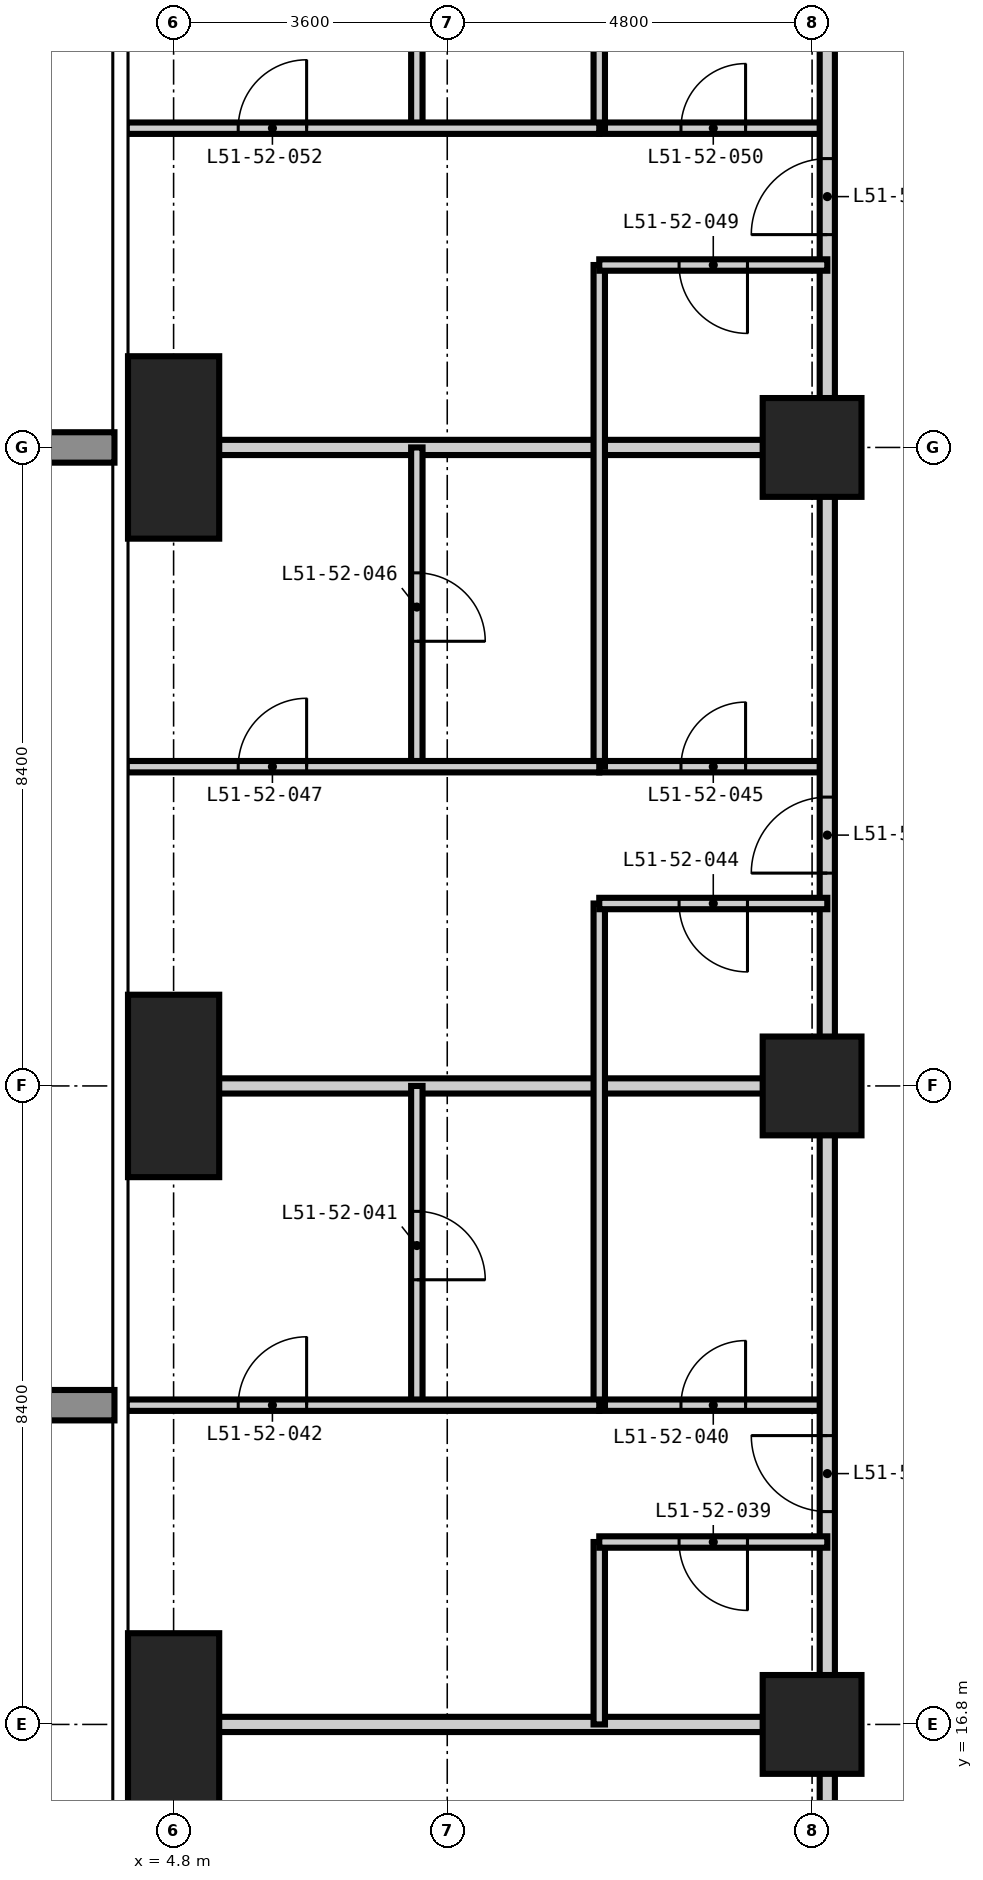
"""IFC4 building model, lengths in metres.
Left out: names, types, materials, properties, quantities, classifications, styles, units other than length and angle.
Written with IfcOpenShell. Run it as: python <this file> out.ifc"""

import sys

from ifc_helpers import new_model, si_unit, direction, frame, frame_2d, origin, origin_2d, place, context, subcontext, project, spatial, rectangle, extrude, element, fill, save


model = new_model("IFC4")
c1 = context("Model", 3, precision=1e-05, world=origin(), true_north=direction((0.0, 1.0)))
c2 = subcontext(c1, "Body", "Model", "MODEL_VIEW")
j1 = project(units=[si_unit("LENGTHUNIT", "METRE"), si_unit("PLANEANGLEUNIT", "RADIAN")], contexts=[c1])
p1 = place(None, origin())
s1 = spatial("IfcSite", under=j1, at=p1, CompositionType="ELEMENT")
p2 = place(p1, origin())
s2 = spatial("IfcBuilding", under=s1, at=p2, CompositionType="ELEMENT")
p3 = place(p2, frame((0.0, 0.0, 198.6)))
s3 = spatial("IfcBuildingStorey", under=s2, at=p3, CompositionType="ELEMENT", Elevation=198.6)
for number, where, z_axis, x_axis in (
    (1, (4.8, 16.8, -0.35), (0.0, 0.0, 1.0), (1.0, 0.0, 0.0)),
    (2, (4.8, 25.2, -0.35), (0.0, 0.0, 1.0), (1.0, 0.0, 0.0)),
    (3, (4.8, 33.6, -0.35), (0.0, 0.0, 1.0), (1.0, 0.0, 0.0)),
):
    element("IfcColumn", number, at=place(p3, frame(where, z_axis=z_axis, x_axis=x_axis)), inside=s3, PredefinedType="COLUMN", context=c2, shape_type="SweptSolid", body=[
        extrude(rectangle(XDim=1.2, YDim=2.4, at=origin_2d()), origin(), (0.0, 0.0, 1.0), 3.6),
    ])
for number, where, z_axis, x_axis in (
    (4, (13.2, 16.8, -0.35), (0.0, 0.0, 1.0), (1.0, 0.0, 0.0)),
    (5, (13.2, 25.2, -0.35), (0.0, 0.0, 1.0), (1.0, 0.0, 0.0)),
    (6, (13.2, 33.6, -0.35), (0.0, 0.0, 1.0), (1.0, 0.0, 0.0)),
):
    element("IfcColumn", number, at=place(p3, frame(where, z_axis=z_axis, x_axis=x_axis)), inside=s3, PredefinedType="COLUMN", context=c2, shape_type="SweptSolid", body=[
        extrude(rectangle(XDim=1.3, YDim=1.3, at=origin_2d()), origin(), (0.0, 0.0, 1.0), 3.6),
    ])
p4 = place(p3, frame((10.4, 21.0, 0.0), z_axis=(0.0, 0.0, 1.0), x_axis=(1.0, 0.0, 0.0)))
e7 = element("IfcWall", 7, at=p4, inside=s3, PredefinedType="PARTITIONING", context=c2, shape_type="SweptSolid", body=[
    extrude(rectangle(XDim=3.0, YDim=0.15, at=frame_2d((1.5, 0.0))), origin(), (0.0, 0.0, 1.0), 3.25),
])
p5 = place(p4, frame((1.075, 0.0, 0.0)))
e8 = element("IfcOpeningElement", 8, at=p5, cuts=e7, PredefinedType="OPENING", context=c2, shape_type="SweptSolid", body=[
    extrude(rectangle(XDim=0.85, YDim=2.1, at=frame_2d((0.425, 1.05))), frame((0.0, 0.085, 0.0), z_axis=(0.0, -1.0, 0.0), x_axis=(1.0, 0.0, 0.0)), (0.0, 0.0, 1.0), 0.17),
])
p6 = place(p3, frame((10.4, 29.4, 0.0), z_axis=(0.0, 0.0, 1.0), x_axis=(1.0, 0.0, 0.0)))
e9 = element("IfcWall", 9, at=p6, inside=s3, PredefinedType="PARTITIONING", context=c2, shape_type="SweptSolid", body=[
    extrude(rectangle(XDim=3.0, YDim=0.15, at=frame_2d((1.5, 0.0))), origin(), (0.0, 0.0, 1.0), 3.25),
])
p7 = place(p6, frame((1.075, 0.0, 0.0)))
e10 = element("IfcOpeningElement", 10, at=p7, cuts=e9, PredefinedType="OPENING", context=c2, shape_type="SweptSolid", body=[
    extrude(rectangle(XDim=0.85, YDim=2.1, at=frame_2d((0.425, 1.05))), frame((0.0, 0.085, 0.0), z_axis=(0.0, -1.0, 0.0), x_axis=(1.0, 0.0, 0.0)), (0.0, 0.0, 1.0), 0.17),
])
p8 = place(p3, frame((10.4, 37.8, 0.0), z_axis=(0.0, 0.0, 1.0), x_axis=(1.0, 0.0, 0.0)))
e11 = element("IfcWall", 11, at=p8, inside=s3, PredefinedType="PARTITIONING", context=c2, shape_type="SweptSolid", body=[
    extrude(rectangle(XDim=3.0, YDim=0.15, at=frame_2d((1.5, 0.0))), origin(), (0.0, 0.0, 1.0), 3.25),
])
p9 = place(p8, frame((1.075, 0.0, 0.0)))
e12 = element("IfcOpeningElement", 12, at=p9, cuts=e11, PredefinedType="OPENING", context=c2, shape_type="SweptSolid", body=[
    extrude(rectangle(XDim=0.85, YDim=2.1, at=frame_2d((0.425, 1.05))), frame((0.0, 0.085, 0.0), z_axis=(0.0, -1.0, 0.0), x_axis=(1.0, 0.0, 0.0)), (0.0, 0.0, 1.0), 0.17),
])
p10 = place(p3, frame((13.4, 13.4, 0.0), z_axis=(0.0, 0.0, 1.0), x_axis=(0.0, 1.0, 0.0)))
e13 = element("IfcWall", 13, at=p10, inside=s3, PredefinedType="PARTITIONING", context=c2, shape_type="SweptSolid", body=[
    extrude(rectangle(XDim=31.4, YDim=0.2, at=frame_2d((15.7, 0.0))), origin(), (0.0, 0.0, 1.0), 3.25),
])
p11 = place(p10, frame((6.2, 0.0, 0.0)))
e14 = element("IfcOpeningElement", 14, at=p11, cuts=e13, PredefinedType="OPENING", context=c2, shape_type="SweptSolid", body=[
    extrude(rectangle(XDim=1.0, YDim=2.2, at=frame_2d((0.5, 1.1))), frame((0.0, 0.11, 0.0), z_axis=(0.0, -1.0, 0.0), x_axis=(1.0, 0.0, 0.0)), (0.0, 0.0, 1.0), 0.22),
])
p12 = place(p10, frame((14.6, 0.0, 0.0)))
e15 = element("IfcOpeningElement", 15, at=p12, cuts=e13, PredefinedType="OPENING", context=c2, shape_type="SweptSolid", body=[
    extrude(rectangle(XDim=1.0, YDim=2.2, at=frame_2d((0.5, 1.1))), frame((0.0, 0.11, 0.0), z_axis=(0.0, -1.0, 0.0), x_axis=(1.0, 0.0, 0.0)), (0.0, 0.0, 1.0), 0.22),
])
p13 = place(p10, frame((23.0, 0.0, 0.0)))
e16 = element("IfcOpeningElement", 16, at=p13, cuts=e13, PredefinedType="OPENING", context=c2, shape_type="SweptSolid", body=[
    extrude(rectangle(XDim=1.0, YDim=2.2, at=frame_2d((0.5, 1.1))), frame((0.0, 0.11, 0.0), z_axis=(0.0, -1.0, 0.0), x_axis=(1.0, 0.0, 0.0)), (0.0, 0.0, 1.0), 0.22),
])
p14 = place(p10, frame((1.2, 0.0, 0.0)))
e17 = element("IfcOpeningElement", 17, at=p14, cuts=e13, PredefinedType="OPENING", context=c2, shape_type="SweptSolid", body=[
    extrude(rectangle(XDim=1.0, YDim=2.2, at=frame_2d((0.5, 1.1))), frame((0.0, 0.11, 0.0), z_axis=(0.0, -1.0, 0.0), x_axis=(1.0, 0.0, 0.0)), (0.0, 0.0, 1.0), 0.22),
])
p15 = place(p10, frame((29.5, 0.0, 0.0)))
e18 = element("IfcOpeningElement", 18, at=p15, cuts=e13, PredefinedType="OPENING", context=c2, shape_type="SweptSolid", body=[
    extrude(rectangle(XDim=1.0, YDim=2.2, at=frame_2d((0.5, 1.1))), frame((0.0, 0.11, 0.0), z_axis=(0.0, -1.0, 0.0), x_axis=(1.0, 0.0, 0.0)), (0.0, 0.0, 1.0), 0.22),
])
for number, where, z_axis, x_axis in (
    (19, (4.182, 16.8, 0.0), (0.0, 0.0, 1.0), (1.0, 0.0, 0.0)),
    (20, (4.182, 25.2, 0.0), (0.0, 0.0, 1.0), (1.0, 0.0, 0.0)),
    (21, (4.182, 33.6, 0.0), (0.0, 0.0, 1.0), (1.0, 0.0, 0.0)),
):
    element("IfcWall", number, at=place(p3, frame(where, z_axis=z_axis, x_axis=x_axis)), inside=s3, PredefinedType="PARTITIONING", context=c2, shape_type="SweptSolid", body=[
        extrude(rectangle(XDim=9.218, YDim=0.2, at=frame_2d((4.609, 0.0))), origin(), (0.0, 0.0, 1.0), 3.25),
    ])
p16 = place(p3, frame((8.0, 21.0, 0.0), z_axis=(0.0, 0.0, 1.0), x_axis=(0.0, 1.0, 0.0)))
e22 = element("IfcWall", 22, at=p16, inside=s3, PredefinedType="PARTITIONING", context=c2, shape_type="SweptSolid", body=[
    extrude(rectangle(XDim=4.2, YDim=0.15, at=frame_2d((2.1, 0.0))), origin(), (0.0, 0.0, 1.0), 3.25),
])
p17 = place(p16, frame((1.65, 0.0, 0.0)))
e23 = element("IfcOpeningElement", 23, at=p17, cuts=e22, PredefinedType="OPENING", context=c2, shape_type="SweptSolid", body=[
    extrude(rectangle(XDim=0.9, YDim=2.1, at=frame_2d((0.45, 1.05))), frame((0.0, 0.085, 0.0), z_axis=(0.0, -1.0, 0.0), x_axis=(1.0, 0.0, 0.0)), (0.0, 0.0, 1.0), 0.17),
])
p18 = place(p3, frame((8.0, 29.4, 0.0), z_axis=(0.0, 0.0, 1.0), x_axis=(0.0, 1.0, 0.0)))
e24 = element("IfcWall", 24, at=p18, inside=s3, PredefinedType="PARTITIONING", context=c2, shape_type="SweptSolid", body=[
    extrude(rectangle(XDim=4.2, YDim=0.15, at=frame_2d((2.1, 0.0))), origin(), (0.0, 0.0, 1.0), 3.25),
])
p19 = place(p18, frame((1.65, 0.0, 0.0)))
e25 = element("IfcOpeningElement", 25, at=p19, cuts=e24, PredefinedType="OPENING", context=c2, shape_type="SweptSolid", body=[
    extrude(rectangle(XDim=0.9, YDim=2.1, at=frame_2d((0.45, 1.05))), frame((0.0, 0.085, 0.0), z_axis=(0.0, -1.0, 0.0), x_axis=(1.0, 0.0, 0.0)), (0.0, 0.0, 1.0), 0.17),
])
p20 = place(p3, frame((8.0, 37.8, 0.0), z_axis=(0.0, 0.0, 1.0), x_axis=(0.0, 1.0, 0.0)))
e26 = element("IfcWall", 26, at=p20, inside=s3, PredefinedType="PARTITIONING", context=c2, shape_type="SweptSolid", body=[
    extrude(rectangle(XDim=4.2, YDim=0.15, at=frame_2d((2.1, 0.0))), origin(), (0.0, 0.0, 1.0), 3.25),
])
p21 = place(p20, frame((1.65, 0.0, 0.0)))
e27 = element("IfcOpeningElement", 27, at=p21, cuts=e26, PredefinedType="OPENING", context=c2, shape_type="SweptSolid", body=[
    extrude(rectangle(XDim=0.9, YDim=2.1, at=frame_2d((0.45, 1.05))), frame((0.0, 0.085, 0.0), z_axis=(0.0, -1.0, 0.0), x_axis=(1.0, 0.0, 0.0)), (0.0, 0.0, 1.0), 0.17),
])
p22 = place(p3, frame((10.4, 16.8, 0.0), z_axis=(0.0, 0.0, 1.0), x_axis=(0.0, 1.0, 0.0)))
e28 = element("IfcWall", 28, at=p22, inside=s3, PredefinedType="PARTITIONING", context=c2, shape_type="SweptSolid", body=[
    extrude(rectangle(XDim=2.4, YDim=0.15, at=frame_2d((1.2, 0.0))), origin(), (0.0, 0.0, 1.0), 3.25),
])
for number, where, z_axis, x_axis in (
    (29, (10.4, 21.0, 0.0), (0.0, 0.0, 1.0), (0.0, 1.0, 0.0)),
    (30, (10.4, 29.4, 0.0), (0.0, 0.0, 1.0), (0.0, 1.0, 0.0)),
):
    element("IfcWall", number, at=place(p3, frame(where, z_axis=z_axis, x_axis=x_axis)), inside=s3, PredefinedType="PARTITIONING", context=c2, shape_type="SweptSolid", body=[
        extrude(rectangle(XDim=6.6, YDim=0.15, at=frame_2d((3.3, 0.0))), origin(), (0.0, 0.0, 1.0), 3.25),
    ])
p23 = place(p3, frame((10.4, 37.8, 0.0), z_axis=(0.0, 0.0, 1.0), x_axis=(0.0, 1.0, 0.0)))
e31 = element("IfcWall", 31, at=p23, inside=s3, PredefinedType="PARTITIONING", context=c2, shape_type="SweptSolid", body=[
    extrude(rectangle(XDim=4.2, YDim=0.15, at=frame_2d((2.1, 0.0))), origin(), (0.0, 0.0, 1.0), 3.25),
])
p24 = place(p3, frame((10.4, 19.2, 0.0), z_axis=(0.0, 0.0, 1.0), x_axis=(1.0, 0.0, 0.0)))
e32 = element("IfcWall", 32, at=p24, inside=s3, PredefinedType="PARTITIONING", context=c2, shape_type="SweptSolid", body=[
    extrude(rectangle(XDim=3.0, YDim=0.15, at=frame_2d((1.5, 0.0))), origin(), (0.0, 0.0, 1.0), 3.25),
])
p25 = place(p24, frame((1.05, 0.0, 0.0)))
e33 = element("IfcOpeningElement", 33, at=p25, cuts=e32, PredefinedType="OPENING", context=c2, shape_type="SweptSolid", body=[
    extrude(rectangle(XDim=0.9, YDim=2.1, at=frame_2d((0.45, 1.05))), frame((0.0, 0.085, 0.0), z_axis=(0.0, -1.0, 0.0), x_axis=(1.0, 0.0, 0.0)), (0.0, 0.0, 1.0), 0.17),
])
p26 = place(p3, frame((4.182, 21.0, 0.0), z_axis=(0.0, 0.0, 1.0), x_axis=(1.0, 0.0, 0.0)))
e34 = element("IfcWall", 34, at=p26, inside=s3, PredefinedType="PARTITIONING", context=c2, shape_type="SweptSolid", body=[
    extrude(rectangle(XDim=6.218, YDim=0.15, at=frame_2d((3.109, 0.0))), origin(), (0.0, 0.0, 1.0), 3.25),
])
p27 = place(p26, frame((1.468, 0.0, 0.0)))
e35 = element("IfcOpeningElement", 35, at=p27, cuts=e34, PredefinedType="OPENING", context=c2, shape_type="SweptSolid", body=[
    extrude(rectangle(XDim=0.9, YDim=2.1, at=frame_2d((0.45, 1.05))), frame((0.0, 0.085, 0.0), z_axis=(0.0, -1.0, 0.0), x_axis=(1.0, 0.0, 0.0)), (0.0, 0.0, 1.0), 0.17),
])
p28 = place(p3, frame((10.4, 27.6, 0.0), z_axis=(0.0, 0.0, 1.0), x_axis=(1.0, 0.0, 0.0)))
e36 = element("IfcWall", 36, at=p28, inside=s3, PredefinedType="PARTITIONING", context=c2, shape_type="SweptSolid", body=[
    extrude(rectangle(XDim=3.0, YDim=0.15, at=frame_2d((1.5, 0.0))), origin(), (0.0, 0.0, 1.0), 3.25),
])
p29 = place(p28, frame((1.05, 0.0, 0.0)))
e37 = element("IfcOpeningElement", 37, at=p29, cuts=e36, PredefinedType="OPENING", context=c2, shape_type="SweptSolid", body=[
    extrude(rectangle(XDim=0.9, YDim=2.1, at=frame_2d((0.45, 1.05))), frame((0.0, 0.085, 0.0), z_axis=(0.0, -1.0, 0.0), x_axis=(1.0, 0.0, 0.0)), (0.0, 0.0, 1.0), 0.17),
])
p30 = place(p3, frame((4.182, 29.4, 0.0), z_axis=(0.0, 0.0, 1.0), x_axis=(1.0, 0.0, 0.0)))
e38 = element("IfcWall", 38, at=p30, inside=s3, PredefinedType="PARTITIONING", context=c2, shape_type="SweptSolid", body=[
    extrude(rectangle(XDim=6.218, YDim=0.15, at=frame_2d((3.109, 0.0))), origin(), (0.0, 0.0, 1.0), 3.25),
])
p31 = place(p30, frame((1.468, 0.0, 0.0)))
e39 = element("IfcOpeningElement", 39, at=p31, cuts=e38, PredefinedType="OPENING", context=c2, shape_type="SweptSolid", body=[
    extrude(rectangle(XDim=0.9, YDim=2.1, at=frame_2d((0.45, 1.05))), frame((0.0, 0.085, 0.0), z_axis=(0.0, -1.0, 0.0), x_axis=(1.0, 0.0, 0.0)), (0.0, 0.0, 1.0), 0.17),
])
p32 = place(p3, frame((10.4, 36.0, 0.0), z_axis=(0.0, 0.0, 1.0), x_axis=(1.0, 0.0, 0.0)))
e40 = element("IfcWall", 40, at=p32, inside=s3, PredefinedType="PARTITIONING", context=c2, shape_type="SweptSolid", body=[
    extrude(rectangle(XDim=3.0, YDim=0.15, at=frame_2d((1.5, 0.0))), origin(), (0.0, 0.0, 1.0), 3.25),
])
p33 = place(p32, frame((1.05, 0.0, 0.0)))
e41 = element("IfcOpeningElement", 41, at=p33, cuts=e40, PredefinedType="OPENING", context=c2, shape_type="SweptSolid", body=[
    extrude(rectangle(XDim=0.9, YDim=2.1, at=frame_2d((0.45, 1.05))), frame((0.0, 0.085, 0.0), z_axis=(0.0, -1.0, 0.0), x_axis=(1.0, 0.0, 0.0)), (0.0, 0.0, 1.0), 0.17),
])
p34 = place(p3, frame((4.182, 37.8, 0.0), z_axis=(0.0, 0.0, 1.0), x_axis=(1.0, 0.0, 0.0)))
e42 = element("IfcWall", 42, at=p34, inside=s3, PredefinedType="PARTITIONING", context=c2, shape_type="SweptSolid", body=[
    extrude(rectangle(XDim=6.218, YDim=0.15, at=frame_2d((3.109, 0.0))), origin(), (0.0, 0.0, 1.0), 3.25),
])
p35 = place(p34, frame((1.468, 0.0, 0.0)))
e43 = element("IfcOpeningElement", 43, at=p35, cuts=e42, PredefinedType="OPENING", context=c2, shape_type="SweptSolid", body=[
    extrude(rectangle(XDim=0.9, YDim=2.1, at=frame_2d((0.45, 1.05))), frame((0.0, 0.085, 0.0), z_axis=(0.0, -1.0, 0.0), x_axis=(1.0, 0.0, 0.0)), (0.0, 0.0, 1.0), 0.17),
])
p36 = place(p11, origin())
e44 = element("IfcDoor", 44, at=p36, inside=s3, OperationType="SINGLE_SWING_RIGHT", PredefinedType="DOOR", context=c2, shape_type="SweptSolid", body=[
    extrude(rectangle(XDim=1.0, YDim=2.2, at=frame_2d((0.5, 1.1))), frame((0.0, 0.025, 0.0), z_axis=(0.0, -1.0, 0.0), x_axis=(1.0, 0.0, 0.0)), (0.0, 0.0, 1.0), 0.05),
])
fill(e14, e44)
p37 = place(p25, frame((0.9, 0.0, 0.0), z_axis=(0.0, 0.0, 1.0), x_axis=(-1.0, 0.0, 0.0)))
e45 = element("IfcDoor", 45, at=p37, inside=s3, OperationType="SINGLE_SWING_LEFT", PredefinedType="DOOR", context=c2, shape_type="SweptSolid", body=[
    extrude(rectangle(XDim=0.9, YDim=2.1, at=frame_2d((0.45, 1.05))), frame((0.0, 0.025, 0.0), z_axis=(0.0, -1.0, 0.0), x_axis=(1.0, 0.0, 0.0)), (0.0, 0.0, 1.0), 0.05),
])
fill(e33, e45)
p38 = place(p5, origin())
e46 = element("IfcDoor", 46, at=p38, inside=s3, OperationType="SINGLE_SWING_RIGHT", PredefinedType="DOOR", context=c2, shape_type="SweptSolid", body=[
    extrude(rectangle(XDim=0.85, YDim=2.1, at=frame_2d((0.425, 1.05))), frame((0.0, 0.025, 0.0), z_axis=(0.0, -1.0, 0.0), x_axis=(1.0, 0.0, 0.0)), (0.0, 0.0, 1.0), 0.05),
])
fill(e8, e46)
p39 = place(p17, frame((0.9, 0.0, 0.0), z_axis=(0.0, 0.0, 1.0), x_axis=(-1.0, 0.0, 0.0)))
e47 = element("IfcDoor", 47, at=p39, inside=s3, OperationType="SINGLE_SWING_RIGHT", PredefinedType="DOOR", context=c2, shape_type="SweptSolid", body=[
    extrude(rectangle(XDim=0.9, YDim=2.1, at=frame_2d((0.45, 1.05))), frame((0.0, 0.025, 0.0), z_axis=(0.0, -1.0, 0.0), x_axis=(1.0, 0.0, 0.0)), (0.0, 0.0, 1.0), 0.05),
])
fill(e23, e47)
p40 = place(p27, origin())
e48 = element("IfcDoor", 48, at=p40, inside=s3, OperationType="SINGLE_SWING_RIGHT", PredefinedType="DOOR", context=c2, shape_type="SweptSolid", body=[
    extrude(rectangle(XDim=0.9, YDim=2.1, at=frame_2d((0.45, 1.05))), frame((0.0, 0.025, 0.0), z_axis=(0.0, -1.0, 0.0), x_axis=(1.0, 0.0, 0.0)), (0.0, 0.0, 1.0), 0.05),
])
fill(e35, e48)
p41 = place(p12, origin())
e49 = element("IfcDoor", 49, at=p41, inside=s3, OperationType="SINGLE_SWING_LEFT", PredefinedType="DOOR", context=c2, shape_type="SweptSolid", body=[
    extrude(rectangle(XDim=1.0, YDim=2.2, at=frame_2d((0.5, 1.1))), frame((0.0, 0.025, 0.0), z_axis=(0.0, -1.0, 0.0), x_axis=(1.0, 0.0, 0.0)), (0.0, 0.0, 1.0), 0.05),
])
fill(e15, e49)
p42 = place(p29, frame((0.9, 0.0, 0.0), z_axis=(0.0, 0.0, 1.0), x_axis=(-1.0, 0.0, 0.0)))
e50 = element("IfcDoor", 50, at=p42, inside=s3, OperationType="SINGLE_SWING_LEFT", PredefinedType="DOOR", context=c2, shape_type="SweptSolid", body=[
    extrude(rectangle(XDim=0.9, YDim=2.1, at=frame_2d((0.45, 1.05))), frame((0.0, 0.025, 0.0), z_axis=(0.0, -1.0, 0.0), x_axis=(1.0, 0.0, 0.0)), (0.0, 0.0, 1.0), 0.05),
])
fill(e37, e50)
p43 = place(p7, origin())
e51 = element("IfcDoor", 51, at=p43, inside=s3, OperationType="SINGLE_SWING_RIGHT", PredefinedType="DOOR", context=c2, shape_type="SweptSolid", body=[
    extrude(rectangle(XDim=0.85, YDim=2.1, at=frame_2d((0.425, 1.05))), frame((0.0, 0.025, 0.0), z_axis=(0.0, -1.0, 0.0), x_axis=(1.0, 0.0, 0.0)), (0.0, 0.0, 1.0), 0.05),
])
fill(e10, e51)
p44 = place(p19, frame((0.9, 0.0, 0.0), z_axis=(0.0, 0.0, 1.0), x_axis=(-1.0, 0.0, 0.0)))
e52 = element("IfcDoor", 52, at=p44, inside=s3, OperationType="SINGLE_SWING_RIGHT", PredefinedType="DOOR", context=c2, shape_type="SweptSolid", body=[
    extrude(rectangle(XDim=0.9, YDim=2.1, at=frame_2d((0.45, 1.05))), frame((0.0, 0.025, 0.0), z_axis=(0.0, -1.0, 0.0), x_axis=(1.0, 0.0, 0.0)), (0.0, 0.0, 1.0), 0.05),
])
fill(e25, e52)
p45 = place(p31, origin())
e53 = element("IfcDoor", 53, at=p45, inside=s3, OperationType="SINGLE_SWING_RIGHT", PredefinedType="DOOR", context=c2, shape_type="SweptSolid", body=[
    extrude(rectangle(XDim=0.9, YDim=2.1, at=frame_2d((0.45, 1.05))), frame((0.0, 0.025, 0.0), z_axis=(0.0, -1.0, 0.0), x_axis=(1.0, 0.0, 0.0)), (0.0, 0.0, 1.0), 0.05),
])
fill(e39, e53)
p46 = place(p13, origin())
e54 = element("IfcDoor", 54, at=p46, inside=s3, OperationType="SINGLE_SWING_LEFT", PredefinedType="DOOR", context=c2, shape_type="SweptSolid", body=[
    extrude(rectangle(XDim=1.0, YDim=2.2, at=frame_2d((0.5, 1.1))), frame((0.0, 0.025, 0.0), z_axis=(0.0, -1.0, 0.0), x_axis=(1.0, 0.0, 0.0)), (0.0, 0.0, 1.0), 0.05),
])
fill(e16, e54)
p47 = place(p33, frame((0.9, 0.0, 0.0), z_axis=(0.0, 0.0, 1.0), x_axis=(-1.0, 0.0, 0.0)))
e55 = element("IfcDoor", 55, at=p47, inside=s3, OperationType="SINGLE_SWING_LEFT", PredefinedType="DOOR", context=c2, shape_type="SweptSolid", body=[
    extrude(rectangle(XDim=0.9, YDim=2.1, at=frame_2d((0.45, 1.05))), frame((0.0, 0.025, 0.0), z_axis=(0.0, -1.0, 0.0), x_axis=(1.0, 0.0, 0.0)), (0.0, 0.0, 1.0), 0.05),
])
fill(e41, e55)
p48 = place(p9, origin())
e56 = element("IfcDoor", 56, at=p48, inside=s3, OperationType="SINGLE_SWING_RIGHT", PredefinedType="DOOR", context=c2, shape_type="SweptSolid", body=[
    extrude(rectangle(XDim=0.85, YDim=2.1, at=frame_2d((0.425, 1.05))), frame((0.0, 0.025, 0.0), z_axis=(0.0, -1.0, 0.0), x_axis=(1.0, 0.0, 0.0)), (0.0, 0.0, 1.0), 0.05),
])
fill(e12, e56)
p49 = place(p35, origin())
e57 = element("IfcDoor", 57, at=p49, inside=s3, OperationType="SINGLE_SWING_RIGHT", PredefinedType="DOOR", context=c2, shape_type="SweptSolid", body=[
    extrude(rectangle(XDim=0.9, YDim=2.1, at=frame_2d((0.45, 1.05))), frame((0.0, 0.025, 0.0), z_axis=(0.0, -1.0, 0.0), x_axis=(1.0, 0.0, 0.0)), (0.0, 0.0, 1.0), 0.05),
])
fill(e43, e57)
save(model, sys.argv[1])
